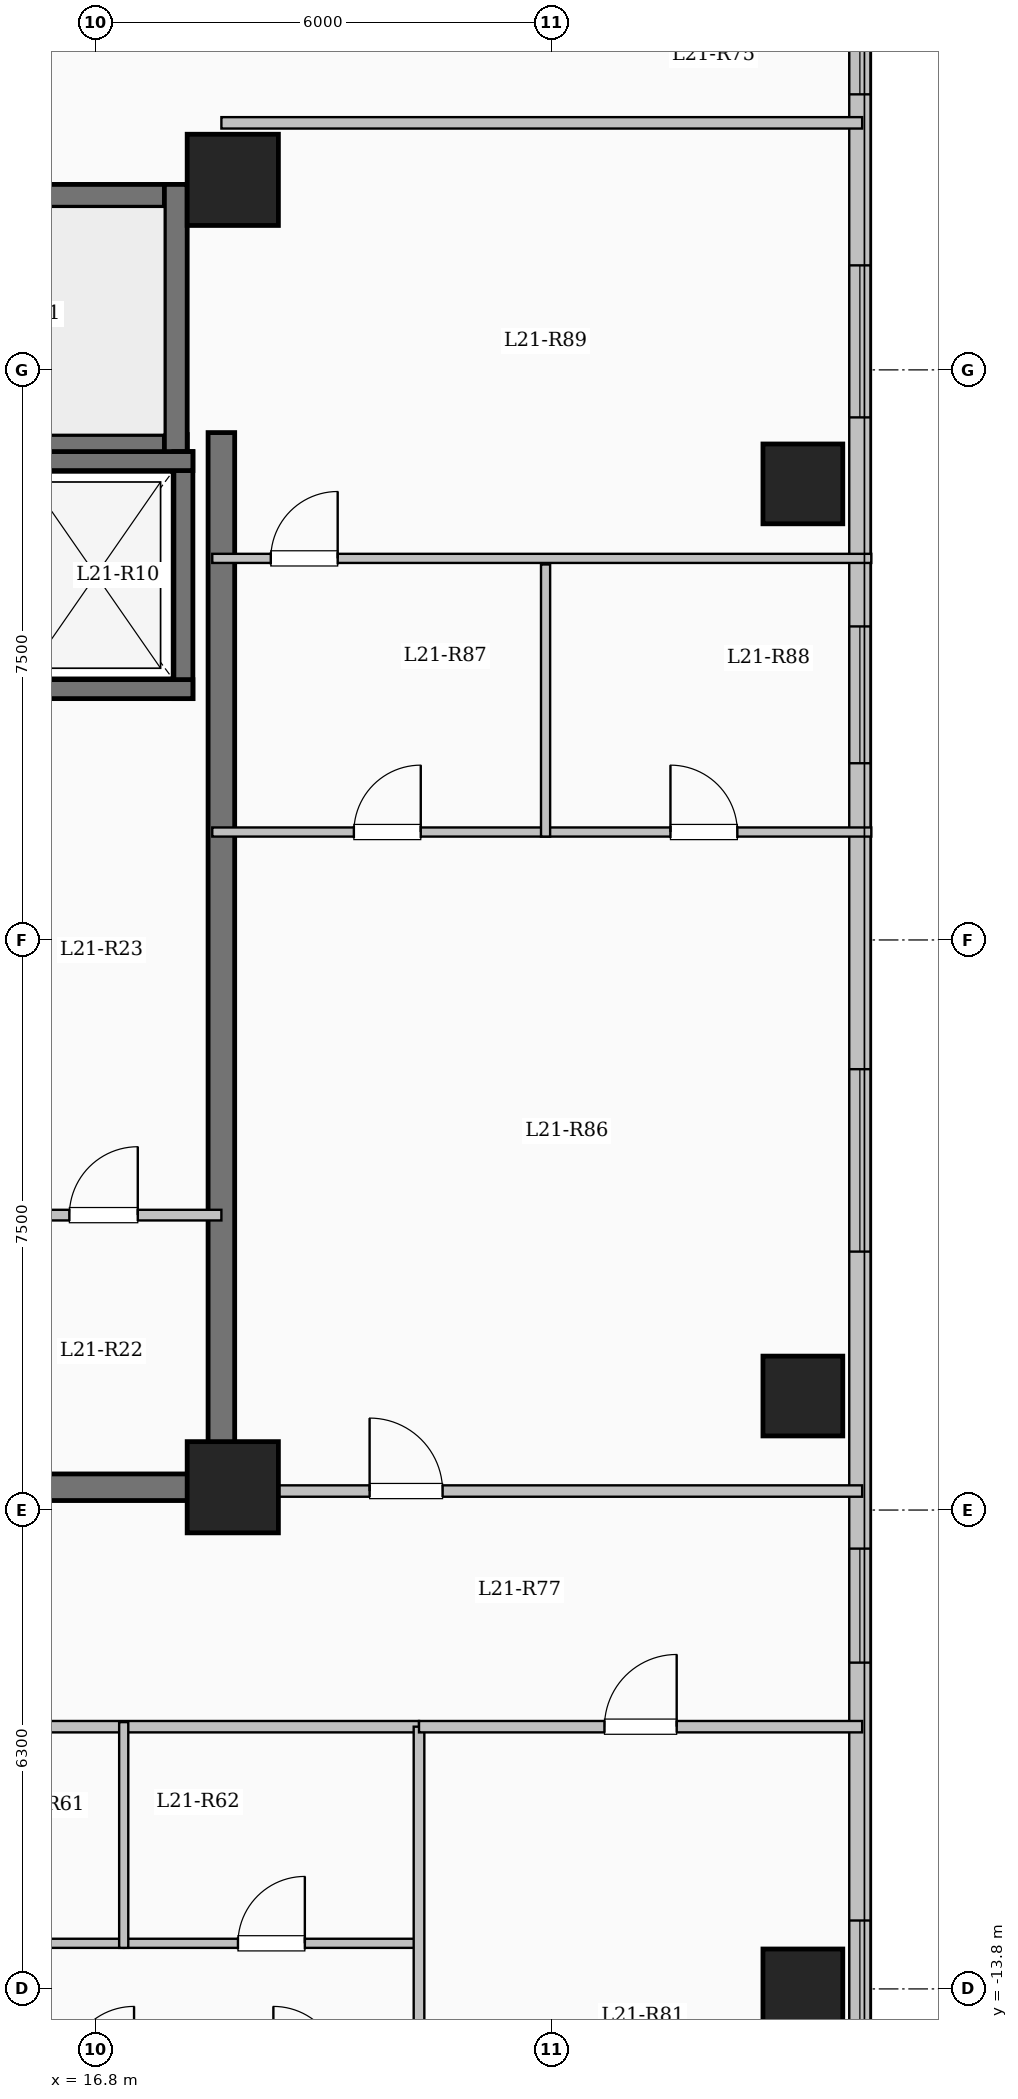
"""IFC4 building model, lengths in metres.
Left out: names, types, materials, properties, quantities, classifications, styles, units other than length and angle.
Written with IfcOpenShell. Run it as: python <this file> out.ifc"""

import sys

from ifc_helpers import new_model, si_unit, direction, frame, frame_2d, origin, origin_2d, place, context, subcontext, project, spatial, rectangle, extrude, element, fill, save


model = new_model("IFC4")
c1 = context("Model", 3, precision=1e-05, world=origin(), true_north=direction((0.0, 1.0)))
c2 = subcontext(c1, "Body", "Model", "MODEL_VIEW")
j1 = project(units=[si_unit("LENGTHUNIT", "METRE"), si_unit("PLANEANGLEUNIT", "RADIAN")], contexts=[c1])
p1 = place(None, origin())
s1 = spatial("IfcSite", under=j1, at=p1, CompositionType="ELEMENT")
p2 = place(p1, origin())
s2 = spatial("IfcBuilding", under=s1, at=p2, CompositionType="ELEMENT")
p3 = place(p2, frame((0.0, 0.0, 81.65)))
s3 = spatial("IfcBuildingStorey", under=s2, at=p3, CompositionType="ELEMENT", Elevation=81.65)
for number, where, z_axis, x_axis in (
    (1, (18.6, -7.2, 0.0), (0.0, 0.0, 1.0), (1.0, 0.0, 0.0)),
    (2, (18.6, 10.0, 0.0), (0.0, 0.0, 1.0), (1.0, 0.0, 0.0)),
):
    element("IfcColumn", number, at=place(p3, frame(where, z_axis=z_axis, x_axis=x_axis)), inside=s3, PredefinedType="COLUMN", context=c2, shape_type="SweptSolid", body=[
        extrude(rectangle(XDim=1.2, YDim=1.2, at=origin_2d()), origin(), (0.0, 0.0, 1.0), 3.35),
    ])
for number, where, z_axis, x_axis in (
    (3, (26.1, -13.8, 0.0), (0.0, 0.0, 1.0), (1.0, 0.0, 0.0)),
    (4, (26.1, -6.0, 0.0), (0.0, 0.0, 1.0), (1.0, 0.0, 0.0)),
    (5, (26.1, 6.0, 0.0), (0.0, 0.0, 1.0), (1.0, 0.0, 0.0)),
):
    element("IfcColumn", number, at=place(p3, frame(where, z_axis=z_axis, x_axis=x_axis)), inside=s3, PredefinedType="COLUMN", context=c2, shape_type="SweptSolid", body=[
        extrude(rectangle(XDim=1.05, YDim=1.05, at=origin_2d()), origin(), (0.0, 0.0, 1.0), 3.35),
    ])
p4 = place(p3, frame((26.85, 17.85, 0.0), z_axis=(0.0, 0.0, 1.0), x_axis=(0.0, -1.0, 0.0)))
e6 = element("IfcWall", 6, at=p4, inside=s3, PredefinedType="SOLIDWALL", context=c2, shape_type="SweptSolid", body=[
    extrude(rectangle(XDim=35.7, YDim=0.28, at=frame_2d((17.85, 0.0))), origin(), (0.0, 0.0, 1.0), 3.1),
])
p5 = place(p4, frame((1.675, 0.0, 0.9)))
e7 = element("IfcOpeningElement", 7, at=p5, cuts=e6, PredefinedType="OPENING", context=c2, shape_type="SweptSolid", body=[
    extrude(rectangle(XDim=2.0, YDim=1.7, at=frame_2d((1.0, 0.85))), frame((0.0, 0.15, 0.0), z_axis=(0.0, -1.0, 0.0), x_axis=(1.0, 0.0, 0.0)), (0.0, 0.0, 1.0), 0.3),
])
p6 = place(p4, frame((5.725, 0.0, 0.95)))
e8 = element("IfcOpeningElement", 8, at=p6, cuts=e6, PredefinedType="OPENING", context=c2, shape_type="SweptSolid", body=[
    extrude(rectangle(XDim=1.0, YDim=1.5, at=frame_2d((0.5, 0.75))), frame((0.0, 0.15, 0.0), z_axis=(0.0, -1.0, 0.0), x_axis=(1.0, 0.0, 0.0)), (0.0, 0.0, 1.0), 0.3),
])
p7 = place(p4, frame((8.975, 0.0, 0.9)))
e9 = element("IfcOpeningElement", 9, at=p7, cuts=e6, PredefinedType="OPENING", context=c2, shape_type="SweptSolid", body=[
    extrude(rectangle(XDim=2.0, YDim=1.7, at=frame_2d((1.0, 0.85))), frame((0.0, 0.15, 0.0), z_axis=(0.0, -1.0, 0.0), x_axis=(1.0, 0.0, 0.0)), (0.0, 0.0, 1.0), 0.3),
])
p8 = place(p4, frame((13.725, 0.0, 0.9)))
e10 = element("IfcOpeningElement", 10, at=p8, cuts=e6, PredefinedType="OPENING", context=c2, shape_type="SweptSolid", body=[
    extrude(rectangle(XDim=1.8, YDim=1.65, at=frame_2d((0.9, 0.825))), frame((0.0, 0.15, 0.0), z_axis=(0.0, -1.0, 0.0), x_axis=(1.0, 0.0, 0.0)), (0.0, 0.0, 1.0), 0.3),
])
p9 = place(p4, frame((19.55, 0.0, 0.9)))
e11 = element("IfcOpeningElement", 11, at=p9, cuts=e6, PredefinedType="OPENING", context=c2, shape_type="SweptSolid", body=[
    extrude(rectangle(XDim=2.4, YDim=1.8, at=frame_2d((1.2, 0.9))), frame((0.0, 0.15, 0.0), z_axis=(0.0, -1.0, 0.0), x_axis=(1.0, 0.0, 0.0)), (0.0, 0.0, 1.0), 0.3),
])
p10 = place(p4, frame((25.857, 0.0, 0.9)))
e12 = element("IfcOpeningElement", 12, at=p10, cuts=e6, PredefinedType="OPENING", context=c2, shape_type="SweptSolid", body=[
    extrude(rectangle(XDim=1.5, YDim=1.65, at=frame_2d((0.75, 0.825))), frame((0.0, 0.15, 0.0), z_axis=(0.0, -1.0, 0.0), x_axis=(1.0, 0.0, 0.0)), (0.0, 0.0, 1.0), 0.3),
])
p11 = place(p4, frame((30.75, 0.0, 0.9)))
e13 = element("IfcOpeningElement", 13, at=p11, cuts=e6, PredefinedType="OPENING", context=c2, shape_type="SweptSolid", body=[
    extrude(rectangle(XDim=2.4, YDim=1.8, at=frame_2d((1.2, 0.9))), frame((0.0, 0.15, 0.0), z_axis=(0.0, -1.0, 0.0), x_axis=(1.0, 0.0, 0.0)), (0.0, 0.0, 1.0), 0.3),
])
p12 = place(p3, frame((10.0, 9.79, 0.0), z_axis=(0.0, 0.0, 1.0), x_axis=(1.0, 0.0, 0.0)))
e14 = element("IfcWall", 14, at=p12, inside=s3, PredefinedType="SHEAR", context=c2, shape_type="SweptSolid", body=[
    extrude(rectangle(XDim=8.0, YDim=0.3, at=frame_2d((4.0, 0.0))), origin(), (0.0, 0.0, 1.0), 3.35),
])
p13 = place(p3, frame((10.0, 6.5, 0.0), z_axis=(0.0, 0.0, 1.0), x_axis=(1.0, 0.0, 0.0)))
e15 = element("IfcWall", 15, at=p13, inside=s3, PredefinedType="SHEAR", context=c2, shape_type="SweptSolid", body=[
    extrude(rectangle(XDim=8.0, YDim=0.3, at=frame_2d((4.0, 0.0))), origin(), (0.0, 0.0, 1.0), 3.35),
])
p14 = place(p13, frame((0.55, 0.0, 0.0)))
e16 = element("IfcOpeningElement", 16, at=p14, cuts=e15, PredefinedType="OPENING", context=c2, shape_type="SweptSolid", body=[
    extrude(rectangle(XDim=1.0, YDim=2.15, at=frame_2d((0.5, 1.075))), frame((0.0, 0.16, 0.0), z_axis=(0.0, -1.0, 0.0), x_axis=(1.0, 0.0, 0.0)), (0.0, 0.0, 1.0), 0.32),
])
p15 = place(p3, frame((17.85, 6.35, 0.0), z_axis=(0.0, 0.0, 1.0), x_axis=(0.0, 1.0, 0.0)))
e17 = element("IfcWall", 17, at=p15, inside=s3, PredefinedType="SHEAR", context=c2, shape_type="SweptSolid", body=[
    extrude(rectangle(XDim=3.59, YDim=0.3, at=frame_2d((1.795, 0.0))), origin(), (0.0, 0.0, 1.0), 3.35),
])
p16 = place(p3, frame((17.95, 3.175, 0.0), z_axis=(0.0, 0.0, 1.0), x_axis=(0.0, 1.0, 0.0)))
e18 = element("IfcWall", 18, at=p16, inside=s3, PredefinedType="SHEAR", context=c2, shape_type="SweptSolid", body=[
    extrude(rectangle(XDim=3.25, YDim=0.25, at=frame_2d((1.625, 0.0))), origin(), (0.0, 0.0, 1.0), 3.35),
])
for number, where, z_axis, x_axis in (
    (19, (15.525, 3.3, 0.0), (0.0, 0.0, 1.0), (1.0, 0.0, 0.0)),
    (20, (15.525, 6.3, 0.0), (0.0, 0.0, 1.0), (1.0, 0.0, 0.0)),
):
    element("IfcWall", number, at=place(p3, frame(where, z_axis=z_axis, x_axis=x_axis)), inside=s3, PredefinedType="SHEAR", context=c2, shape_type="SweptSolid", body=[
        extrude(rectangle(XDim=2.55, YDim=0.25, at=frame_2d((1.275, 0.0))), origin(), (0.0, 0.0, 1.0), 3.35),
    ])
p17 = place(p3, frame((18.45, -7.375, 0.0), z_axis=(0.0, 0.0, 1.0), x_axis=(0.0, 1.0, 0.0)))
e21 = element("IfcWall", 21, at=p17, inside=s3, PredefinedType="SHEAR", context=c2, shape_type="SweptSolid", body=[
    extrude(rectangle(XDim=14.05, YDim=0.35, at=frame_2d((7.025, 0.0))), origin(), (0.0, 0.0, 1.0), 3.35),
])
p18 = place(p3, frame((10.075, -7.2, 0.0), z_axis=(0.0, 0.0, 1.0), x_axis=(1.0, 0.0, 0.0)))
e22 = element("IfcWall", 22, at=p18, inside=s3, PredefinedType="SHEAR", context=c2, shape_type="SweptSolid", body=[
    extrude(rectangle(XDim=8.55, YDim=0.35, at=frame_2d((4.275, 0.0))), origin(), (0.0, 0.0, 1.0), 3.35),
])
p19 = place(p3, frame((15.4, -3.62, 0.0), z_axis=(0.0, 0.0, 1.0), x_axis=(1.0, 0.0, 0.0)))
e23 = element("IfcWall", 23, at=p19, inside=s3, PredefinedType="PARTITIONING", context=c2, shape_type="SweptSolid", body=[
    extrude(rectangle(XDim=3.05, YDim=0.14, at=frame_2d((1.525, 0.0))), origin(), (0.0, 0.0, 1.0), 3.1),
])
p20 = place(p19, frame((1.05, 0.0, 0.0)))
e24 = element("IfcOpeningElement", 24, at=p20, cuts=e23, PredefinedType="OPENING", context=c2, shape_type="SweptSolid", body=[
    extrude(rectangle(XDim=0.9, YDim=2.08, at=frame_2d((0.45, 1.04))), frame((0.0, 0.08, 0.0), z_axis=(0.0, -1.0, 0.0), x_axis=(1.0, 0.0, 0.0)), (0.0, 0.0, 1.0), 0.16),
])
p21 = place(p3, frame((8.55, -10.35, 0.0), z_axis=(0.0, 0.0, 1.0), x_axis=(1.0, 0.0, 0.0)))
e25 = element("IfcWall", 25, at=p21, inside=s3, PredefinedType="PARTITIONING", context=c2, shape_type="SweptSolid", body=[
    extrude(rectangle(XDim=12.5, YDim=0.15, at=frame_2d((6.25, 0.0))), origin(), (0.0, 0.0, 1.0), 3.1),
])
p22 = place(p21, frame((0.75, 0.0, 0.0)))
e26 = element("IfcOpeningElement", 26, at=p22, cuts=e25, PredefinedType="OPENING", context=c2, shape_type="SweptSolid", body=[
    extrude(rectangle(XDim=0.96, YDim=2.15, at=frame_2d((0.48, 1.075))), frame((0.0, 0.085, 0.0), z_axis=(0.0, -1.0, 0.0), x_axis=(1.0, 0.0, 0.0)), (0.0, 0.0, 1.0), 0.17),
])
p23 = place(p3, frame((12.852, -13.2, 0.0), z_axis=(0.0, 0.0, 1.0), x_axis=(1.0, 0.0, 0.0)))
e27 = element("IfcWall", 27, at=p23, inside=s3, PredefinedType="PARTITIONING", context=c2, shape_type="SweptSolid", body=[
    extrude(rectangle(XDim=4.313, YDim=0.12, at=frame_2d((2.156, 0.0))), origin(), (0.0, 0.0, 1.0), 3.1),
])
p24 = place(p23, frame((1.716, 0.0, 0.0)))
e28 = element("IfcOpeningElement", 28, at=p24, cuts=e27, PredefinedType="OPENING", context=c2, shape_type="SweptSolid", body=[
    extrude(rectangle(XDim=0.88, YDim=2.1, at=frame_2d((0.44, 1.05))), frame((0.0, 0.07, 0.0), z_axis=(0.0, -1.0, 0.0), x_axis=(1.0, 0.0, 0.0)), (0.0, 0.0, 1.0), 0.14),
])
p25 = place(p3, frame((17.165, -13.2, 0.0), z_axis=(0.0, 0.0, 1.0), x_axis=(1.0, 0.0, 0.0)))
e29 = element("IfcWall", 29, at=p25, inside=s3, PredefinedType="PARTITIONING", context=c2, shape_type="SweptSolid", body=[
    extrude(rectangle(XDim=3.885, YDim=0.12, at=frame_2d((1.942, 0.0))), origin(), (0.0, 0.0, 1.0), 3.1),
])
p26 = place(p25, frame((1.503, 0.0, 0.0)))
e30 = element("IfcOpeningElement", 30, at=p26, cuts=e29, PredefinedType="OPENING", context=c2, shape_type="SweptSolid", body=[
    extrude(rectangle(XDim=0.88, YDim=2.1, at=frame_2d((0.44, 1.05))), frame((0.0, 0.07, 0.0), z_axis=(0.0, -1.0, 0.0), x_axis=(1.0, 0.0, 0.0)), (0.0, 0.0, 1.0), 0.14),
])
p27 = place(p3, frame((17.165, -13.26, 0.0), z_axis=(0.0, 0.0, 1.0), x_axis=(0.0, 1.0, 0.0)))
e31 = element("IfcWall", 31, at=p27, inside=s3, PredefinedType="PARTITIONING", context=c2, shape_type="SweptSolid", body=[
    extrude(rectangle(XDim=2.97, YDim=0.12, at=frame_2d((1.485, 0.0))), origin(), (0.0, 0.0, 1.0), 3.1),
])
p28 = place(p3, frame((18.45, -7.25, 0.0), z_axis=(0.0, 0.0, 1.0), x_axis=(1.0, 0.0, 0.0)))
e32 = element("IfcWall", 32, at=p28, inside=s3, PredefinedType="PARTITIONING", context=c2, shape_type="SweptSolid", body=[
    extrude(rectangle(XDim=8.43, YDim=0.15, at=frame_2d((4.215, 0.0))), origin(), (0.0, 0.0, 1.0), 3.1),
])
p29 = place(p28, frame((1.95, 0.0, 0.0)))
e33 = element("IfcOpeningElement", 33, at=p29, cuts=e32, PredefinedType="OPENING", context=c2, shape_type="SweptSolid", body=[
    extrude(rectangle(XDim=0.96, YDim=2.15, at=frame_2d((0.48, 1.075))), frame((0.0, 0.085, 0.0), z_axis=(0.0, -1.0, 0.0), x_axis=(1.0, 0.0, 0.0)), (0.0, 0.0, 1.0), 0.17),
])
p30 = place(p3, frame((18.45, 10.75, 0.0), z_axis=(0.0, 0.0, 1.0), x_axis=(1.0, 0.0, 0.0)))
e34 = element("IfcWall", 34, at=p30, inside=s3, PredefinedType="PARTITIONING", context=c2, shape_type="SweptSolid", body=[
    extrude(rectangle(XDim=8.43, YDim=0.15, at=frame_2d((4.215, 0.0))), origin(), (0.0, 0.0, 1.0), 3.1),
])
p31 = place(p3, frame((21.05, -17.85, 0.0), z_axis=(0.0, 0.0, 1.0), x_axis=(0.0, 1.0, 0.0)))
e35 = element("IfcWall", 35, at=p31, inside=s3, PredefinedType="PARTITIONING", context=c2, shape_type="SweptSolid", body=[
    extrude(rectangle(XDim=7.5, YDim=0.14, at=frame_2d((3.75, 0.0))), origin(), (0.0, 0.0, 1.0), 3.1),
])
p32 = place(p3, frame((21.05, -10.35, 0.0), z_axis=(0.0, 0.0, 1.0), x_axis=(1.0, 0.0, 0.0)))
e36 = element("IfcWall", 36, at=p32, inside=s3, PredefinedType="PARTITIONING", context=c2, shape_type="SweptSolid", body=[
    extrude(rectangle(XDim=5.83, YDim=0.15, at=frame_2d((2.915, 0.0))), origin(), (0.0, 0.0, 1.0), 3.1),
])
p33 = place(p32, frame((2.44, 0.0, 0.0)))
e37 = element("IfcOpeningElement", 37, at=p33, cuts=e36, PredefinedType="OPENING", context=c2, shape_type="SweptSolid", body=[
    extrude(rectangle(XDim=0.95, YDim=2.15, at=frame_2d((0.475, 1.075))), frame((0.0, 0.085, 0.0), z_axis=(0.0, -1.0, 0.0), x_axis=(1.0, 0.0, 0.0)), (0.0, 0.0, 1.0), 0.17),
])
p34 = place(p3, frame((18.33, 1.42, 0.0), z_axis=(0.0, 0.0, 1.0), x_axis=(1.0, 0.0, 0.0)))
e38 = element("IfcWall", 38, at=p34, inside=s3, PredefinedType="PARTITIONING", context=c2, shape_type="SweptSolid", body=[
    extrude(rectangle(XDim=8.67, YDim=0.12, at=frame_2d((4.335, 0.0))), origin(), (0.0, 0.0, 1.0), 3.1),
])
p35 = place(p34, frame((1.863, 0.0, 0.0)))
e39 = element("IfcOpeningElement", 39, at=p35, cuts=e38, PredefinedType="OPENING", context=c2, shape_type="SweptSolid", body=[
    extrude(rectangle(XDim=0.88, YDim=2.1, at=frame_2d((0.44, 1.05))), frame((0.0, 0.07, 0.0), z_axis=(0.0, -1.0, 0.0), x_axis=(1.0, 0.0, 0.0)), (0.0, 0.0, 1.0), 0.14),
])
p36 = place(p34, frame((6.028, 0.0, 0.0)))
e40 = element("IfcOpeningElement", 40, at=p36, cuts=e38, PredefinedType="OPENING", context=c2, shape_type="SweptSolid", body=[
    extrude(rectangle(XDim=0.88, YDim=2.1, at=frame_2d((0.44, 1.05))), frame((0.0, 0.07, 0.0), z_axis=(0.0, -1.0, 0.0), x_axis=(1.0, 0.0, 0.0)), (0.0, 0.0, 1.0), 0.14),
])
p37 = place(p3, frame((18.33, 5.02, 0.0), z_axis=(0.0, 0.0, 1.0), x_axis=(1.0, 0.0, 0.0)))
e41 = element("IfcWall", 41, at=p37, inside=s3, PredefinedType="PARTITIONING", context=c2, shape_type="SweptSolid", body=[
    extrude(rectangle(XDim=8.67, YDim=0.12, at=frame_2d((4.335, 0.0))), origin(), (0.0, 0.0, 1.0), 3.1),
])
p38 = place(p37, frame((0.77, 0.0, 0.0)))
e42 = element("IfcOpeningElement", 42, at=p38, cuts=e41, PredefinedType="OPENING", context=c2, shape_type="SweptSolid", body=[
    extrude(rectangle(XDim=0.88, YDim=2.1, at=frame_2d((0.44, 1.05))), frame((0.0, 0.07, 0.0), z_axis=(0.0, -1.0, 0.0), x_axis=(1.0, 0.0, 0.0)), (0.0, 0.0, 1.0), 0.14),
])
p39 = place(p3, frame((22.715, 1.36, 0.0), z_axis=(0.0, 0.0, 1.0), x_axis=(0.0, 1.0, 0.0)))
e43 = element("IfcWall", 43, at=p39, inside=s3, PredefinedType="PARTITIONING", context=c2, shape_type="SweptSolid", body=[
    extrude(rectangle(XDim=3.58, YDim=0.12, at=frame_2d((1.79, 0.0))), origin(), (0.0, 0.0, 1.0), 3.1),
])
p40 = place(p6, origin())
e44 = element("IfcWindow", 44, at=p40, inside=s3, PartitioningType="SINGLE_PANEL", PredefinedType="WINDOW", context=c2, shape_type="SweptSolid", body=[
    extrude(rectangle(XDim=1.0, YDim=1.5, at=frame_2d((0.5, 0.75))), frame((0.0, 0.03, 0.0), z_axis=(0.0, -1.0, 0.0), x_axis=(1.0, 0.0, 0.0)), (0.0, 0.0, 1.0), 0.06),
])
fill(e8, e44)
p41 = place(p7, origin())
e45 = element("IfcWindow", 45, at=p41, inside=s3, PartitioningType="SINGLE_PANEL", PredefinedType="WINDOW", context=c2, shape_type="SweptSolid", body=[
    extrude(rectangle(XDim=2.0, YDim=1.7, at=frame_2d((1.0, 0.85))), frame((0.0, 0.03, 0.0), z_axis=(0.0, -1.0, 0.0), x_axis=(1.0, 0.0, 0.0)), (0.0, 0.0, 1.0), 0.06),
])
fill(e9, e45)
p42 = place(p8, origin())
e46 = element("IfcWindow", 46, at=p42, inside=s3, PartitioningType="SINGLE_PANEL", PredefinedType="WINDOW", context=c2, shape_type="SweptSolid", body=[
    extrude(rectangle(XDim=1.8, YDim=1.65, at=frame_2d((0.9, 0.825))), frame((0.0, 0.03, 0.0), z_axis=(0.0, -1.0, 0.0), x_axis=(1.0, 0.0, 0.0)), (0.0, 0.0, 1.0), 0.06),
])
fill(e10, e46)
p43 = place(p9, origin())
e47 = element("IfcWindow", 47, at=p43, inside=s3, PartitioningType="SINGLE_PANEL", PredefinedType="WINDOW", context=c2, shape_type="SweptSolid", body=[
    extrude(rectangle(XDim=2.4, YDim=1.8, at=frame_2d((1.2, 0.9))), frame((0.0, 0.03, 0.0), z_axis=(0.0, -1.0, 0.0), x_axis=(1.0, 0.0, 0.0)), (0.0, 0.0, 1.0), 0.06),
])
fill(e11, e47)
p44 = place(p10, origin())
e48 = element("IfcWindow", 48, at=p44, inside=s3, PartitioningType="SINGLE_PANEL", PredefinedType="WINDOW", context=c2, shape_type="SweptSolid", body=[
    extrude(rectangle(XDim=1.5, YDim=1.65, at=frame_2d((0.75, 0.825))), frame((0.0, 0.03, 0.0), z_axis=(0.0, -1.0, 0.0), x_axis=(1.0, 0.0, 0.0)), (0.0, 0.0, 1.0), 0.06),
])
fill(e12, e48)
p45 = place(p11, origin())
e49 = element("IfcWindow", 49, at=p45, inside=s3, PartitioningType="SINGLE_PANEL", PredefinedType="WINDOW", context=c2, shape_type="SweptSolid", body=[
    extrude(rectangle(XDim=2.4, YDim=1.8, at=frame_2d((1.2, 0.9))), frame((0.0, 0.03, 0.0), z_axis=(0.0, -1.0, 0.0), x_axis=(1.0, 0.0, 0.0)), (0.0, 0.0, 1.0), 0.06),
])
fill(e13, e49)
p46 = place(p20, origin())
e50 = element("IfcDoor", 50, at=p46, inside=s3, OperationType="SINGLE_SWING_RIGHT", PredefinedType="DOOR", context=c2, shape_type="SweptSolid", body=[
    extrude(rectangle(XDim=0.9, YDim=2.08, at=frame_2d((0.45, 1.04))), frame((0.0, 0.025, 0.0), z_axis=(0.0, -1.0, 0.0), x_axis=(1.0, 0.0, 0.0)), (0.0, 0.0, 1.0), 0.05),
])
fill(e24, e50)
p47 = place(p26, origin())
e51 = element("IfcDoor", 51, at=p47, inside=s3, OperationType="SINGLE_SWING_RIGHT", PredefinedType="DOOR", context=c2, shape_type="SweptSolid", body=[
    extrude(rectangle(XDim=0.88, YDim=2.1, at=frame_2d((0.44, 1.05))), frame((0.0, 0.025, 0.0), z_axis=(0.0, -1.0, 0.0), x_axis=(1.0, 0.0, 0.0)), (0.0, 0.0, 1.0), 0.05),
])
fill(e30, e51)
p48 = place(p33, origin())
e52 = element("IfcDoor", 52, at=p48, inside=s3, OperationType="SINGLE_SWING_RIGHT", PredefinedType="DOOR", context=c2, shape_type="SweptSolid", body=[
    extrude(rectangle(XDim=0.95, YDim=2.15, at=frame_2d((0.475, 1.075))), frame((0.0, 0.025, 0.0), z_axis=(0.0, -1.0, 0.0), x_axis=(1.0, 0.0, 0.0)), (0.0, 0.0, 1.0), 0.05),
])
fill(e37, e52)
p49 = place(p29, origin())
e53 = element("IfcDoor", 53, at=p49, inside=s3, OperationType="SINGLE_SWING_LEFT", PredefinedType="DOOR", context=c2, shape_type="SweptSolid", body=[
    extrude(rectangle(XDim=0.96, YDim=2.15, at=frame_2d((0.48, 1.075))), frame((0.0, 0.025, 0.0), z_axis=(0.0, -1.0, 0.0), x_axis=(1.0, 0.0, 0.0)), (0.0, 0.0, 1.0), 0.05),
])
fill(e33, e53)
p50 = place(p35, origin())
e54 = element("IfcDoor", 54, at=p50, inside=s3, OperationType="SINGLE_SWING_RIGHT", PredefinedType="DOOR", context=c2, shape_type="SweptSolid", body=[
    extrude(rectangle(XDim=0.88, YDim=2.1, at=frame_2d((0.44, 1.05))), frame((0.0, 0.025, 0.0), z_axis=(0.0, -1.0, 0.0), x_axis=(1.0, 0.0, 0.0)), (0.0, 0.0, 1.0), 0.05),
])
fill(e39, e54)
p51 = place(p36, origin())
e55 = element("IfcDoor", 55, at=p51, inside=s3, OperationType="SINGLE_SWING_LEFT", PredefinedType="DOOR", context=c2, shape_type="SweptSolid", body=[
    extrude(rectangle(XDim=0.88, YDim=2.1, at=frame_2d((0.44, 1.05))), frame((0.0, 0.025, 0.0), z_axis=(0.0, -1.0, 0.0), x_axis=(1.0, 0.0, 0.0)), (0.0, 0.0, 1.0), 0.05),
])
fill(e40, e55)
p52 = place(p38, origin())
e56 = element("IfcDoor", 56, at=p52, inside=s3, OperationType="SINGLE_SWING_RIGHT", PredefinedType="DOOR", context=c2, shape_type="SweptSolid", body=[
    extrude(rectangle(XDim=0.88, YDim=2.1, at=frame_2d((0.44, 1.05))), frame((0.0, 0.025, 0.0), z_axis=(0.0, -1.0, 0.0), x_axis=(1.0, 0.0, 0.0)), (0.0, 0.0, 1.0), 0.05),
])
fill(e42, e56)
save(model, sys.argv[1])
